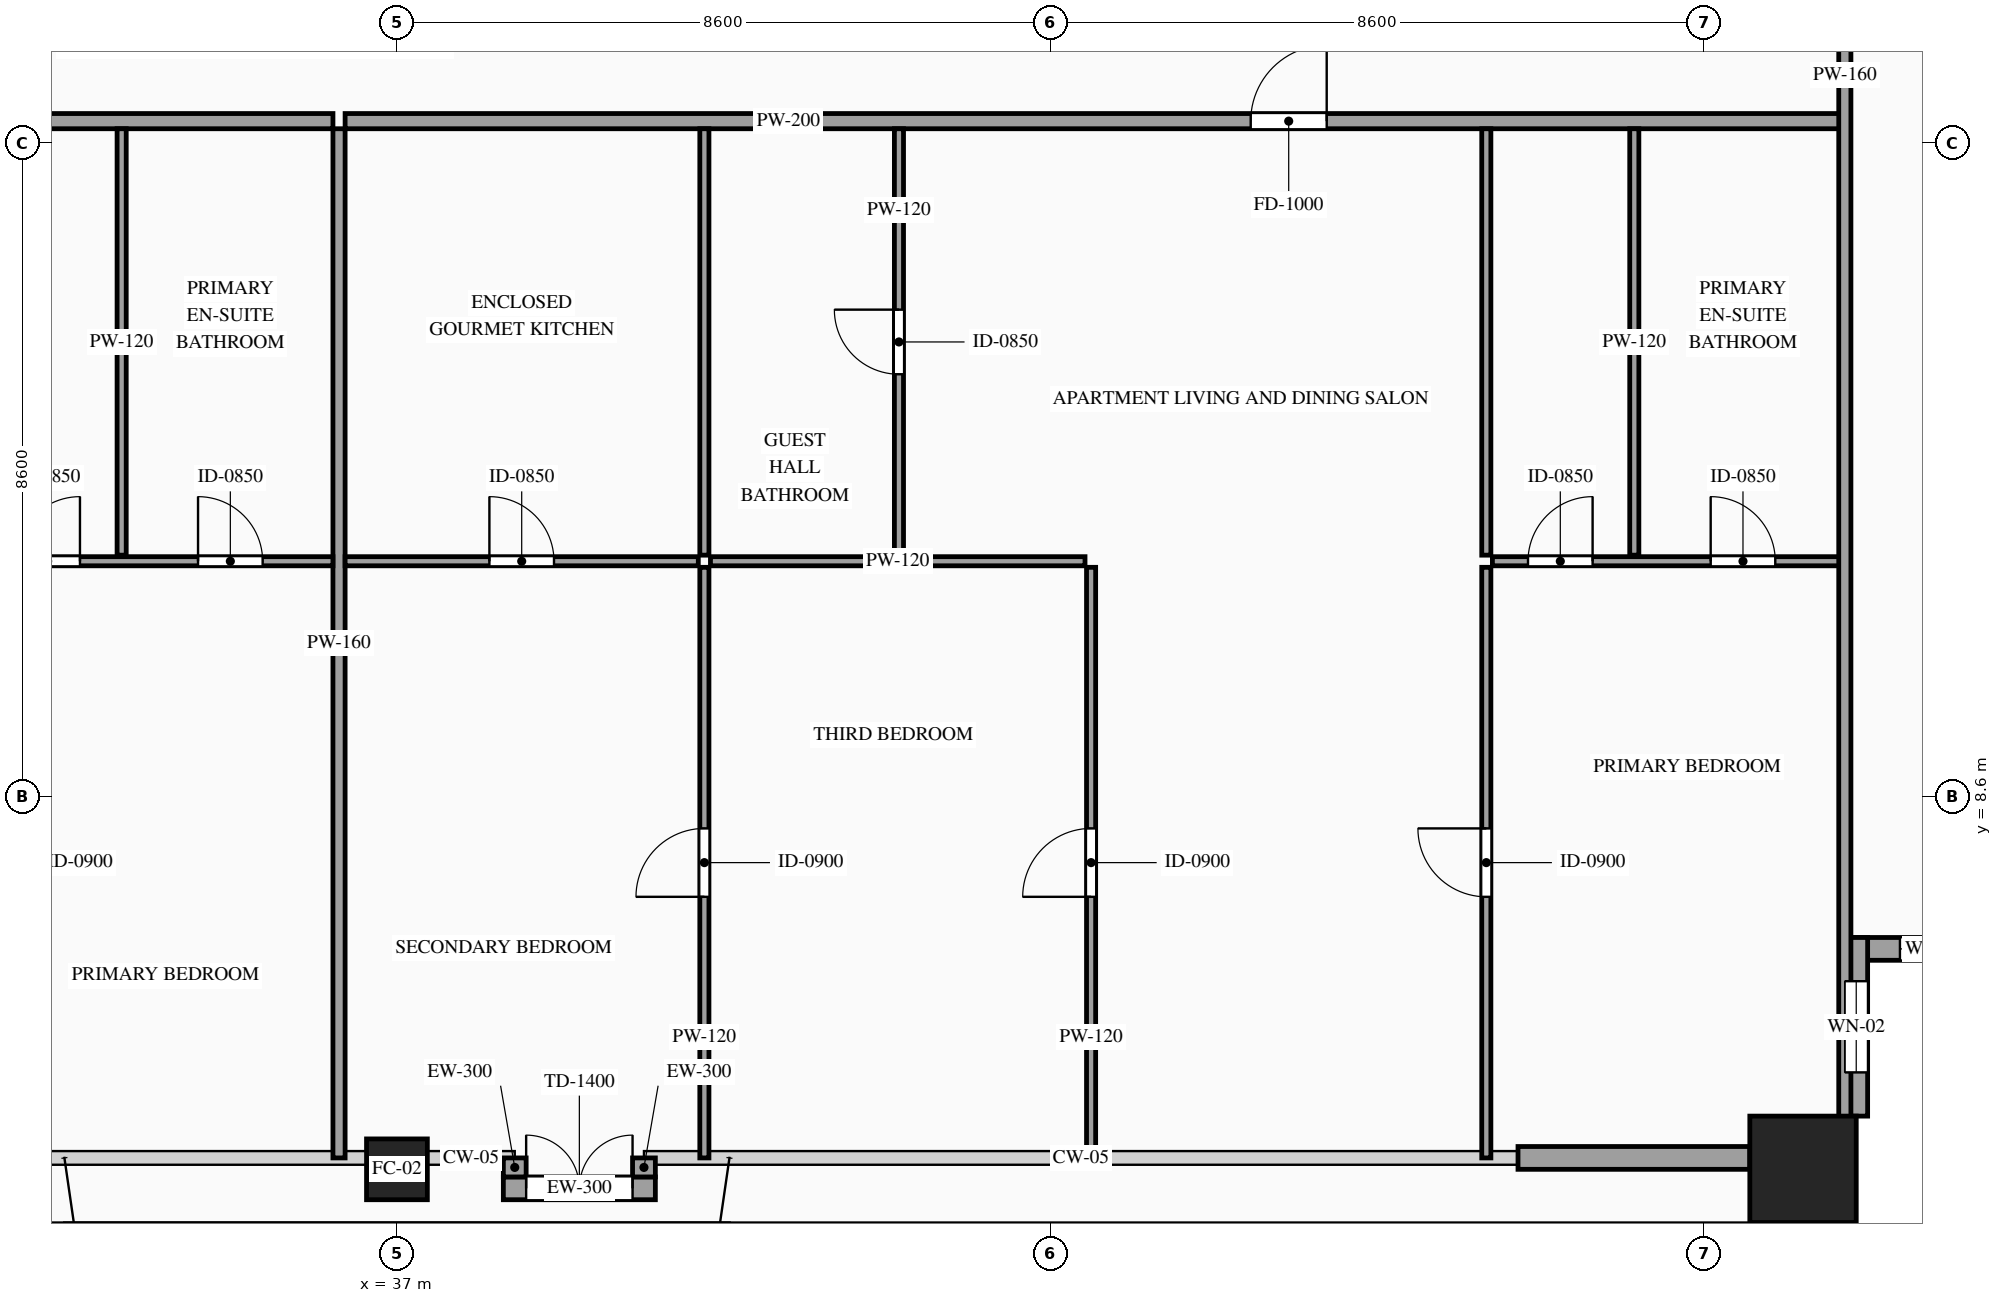
"""IFC4 building model, lengths in metres.
Left out: names, types, materials, properties, quantities, classifications, styles, units other than length and angle.
Written with IfcOpenShell. Run it as: python <this file> out.ifc"""

import sys

from ifc_helpers import new_model, si_unit, direction, frame, frame_2d, origin, origin_2d, place, context, subcontext, project, spatial, rectangle, hollow_rectangle, extrude, source, transform, mapped, element, fill, save


model = new_model("IFC4")
c1 = context("Model", 3, precision=1e-05, world=origin(), true_north=direction((0.0, 1.0)))
c2 = subcontext(c1, "Body", "Model", "MODEL_VIEW")
j1 = project(units=[si_unit("LENGTHUNIT", "METRE"), si_unit("PLANEANGLEUNIT", "RADIAN")], contexts=[c1])
p1 = place(None, origin())
s1 = spatial("IfcSite", under=j1, at=p1, CompositionType="ELEMENT")
p2 = place(p1, origin())
s2 = spatial("IfcBuilding", under=s1, at=p2, CompositionType="ELEMENT")
p3 = place(p2, frame((0.0, 0.0, 191.5)))
s3 = spatial("IfcBuildingStorey", under=s2, at=p3, CompositionType="ELEMENT", Elevation=191.5)
m1 = source(origin(), c2, "Body", "SweptSolid", [
    extrude(hollow_rectangle(XDim=0.8, YDim=0.8, WallThickness=0.036, at=origin_2d()), origin(), (0.0, 0.0, 1.0), 3.5),
])
p4 = place(p3, frame((37.0, 3.7, 0.0), z_axis=(0.0, 0.0, 1.0), x_axis=(1.0, 0.0, 0.0)))
e1 = element("IfcColumn", 1, at=p4, inside=s3, PredefinedType="COLUMN", context=c2, shape_type="MappedRepresentation", body=[
    mapped(m1, transform((0.0, 0.0, 0.0), scale=1.0)),
])
m2 = source(origin(), c2, "Body", "SweptSolid", [
    extrude(hollow_rectangle(XDim=1.4, YDim=1.4, WallThickness=0.06, at=origin_2d()), origin(), (0.0, 0.0, 1.0), 3.5),
])
p5 = place(p3, frame((55.5, 3.7, 0.0), z_axis=(0.0, 0.0, 1.0), x_axis=(1.0, 0.0, 0.0)))
e2 = element("IfcColumn", 2, at=p5, inside=s3, PredefinedType="COLUMN", context=c2, shape_type="MappedRepresentation", body=[
    mapped(m2, transform((0.0, 0.0, 0.0), scale=1.0)),
])
p6 = place(p3, frame((56.05, 6.6, 0.0), z_axis=(0.0, 0.0, 1.0), x_axis=(1.0, 0.0, 0.0)))
e3 = element("IfcWall", 3, at=p6, inside=s3, PredefinedType="SOLIDWALL", context=c2, shape_type="SweptSolid", body=[
    extrude(rectangle(XDim=2.35, YDim=0.3, at=frame_2d((1.175, 0.0))), origin(), (0.0, 0.0, 1.0), 3.28),
])
p7 = place(p6, frame((0.725, 0.0, 0.85)))
e4 = element("IfcOpeningElement", 4, at=p7, cuts=e3, PredefinedType="OPENING", context=c2, shape_type="SweptSolid", body=[
    extrude(rectangle(XDim=0.9, YDim=1.5, at=frame_2d((0.45, 0.75))), frame((0.0, 0.165, 0.0), z_axis=(0.0, -1.0, 0.0), x_axis=(1.0, 0.0, 0.0)), (0.0, 0.0, 1.0), 0.33),
])
p8 = place(p3, frame((56.2, 4.4, 0.0), z_axis=(0.0, 0.0, 1.0), x_axis=(0.0, 1.0, 0.0)))
e5 = element("IfcWall", 5, at=p8, inside=s3, PredefinedType="SOLIDWALL", context=c2, shape_type="SweptSolid", body=[
    extrude(rectangle(XDim=2.35, YDim=0.3, at=frame_2d((1.175, 0.0))), origin(), (0.0, 0.0, 1.0), 3.28),
])
p9 = place(p8, frame((0.575, 0.0, 0.85)))
e6 = element("IfcOpeningElement", 6, at=p9, cuts=e5, PredefinedType="OPENING", context=c2, shape_type="SweptSolid", body=[
    extrude(rectangle(XDim=1.2, YDim=2.1, at=frame_2d((0.6, 1.05))), frame((0.0, 0.165, 0.0), z_axis=(0.0, -1.0, 0.0), x_axis=(1.0, 0.0, 0.0)), (0.0, 0.0, 1.0), 0.33),
])
m3 = source(origin(), c2, "Body", "SweptSolid", [
    extrude(rectangle(XDim=3.05, YDim=0.3, at=frame_2d((1.525, 0.0))), origin(), (0.0, 0.0, 1.0), 2.835),
])
p10 = place(p3, frame((51.75, 3.85, 0.0), z_axis=(0.0, 0.0, 1.0), x_axis=(1.0, 0.0, 0.0)))
e7 = element("IfcWall", 7, at=p10, inside=s3, PredefinedType="SOLIDWALL", context=c2, shape_type="MappedRepresentation", body=[
    mapped(m3, transform((0.0, 0.0, 0.0), scale=1.0)),
])
p11 = place(p3, frame((38.4, 3.45, 0.0), z_axis=(0.0, 0.0, 1.0), x_axis=(1.0, 0.0, 0.0)))
e8 = element("IfcWall", 8, at=p11, inside=s3, PredefinedType="SOLIDWALL", context=c2, shape_type="SweptSolid", body=[
    extrude(rectangle(XDim=2.0, YDim=0.3, at=frame_2d((1.0, 0.0))), origin(), (0.0, 0.0, 1.0), 2.835),
])
p12 = place(p11, frame((0.3, 0.0, 0.0)))
e9 = element("IfcOpeningElement", 9, at=p12, cuts=e8, PredefinedType="OPENING", context=c2, shape_type="SweptSolid", body=[
    extrude(rectangle(XDim=1.4, YDim=2.3, at=frame_2d((0.7, 1.15))), frame((0.0, 0.165, 0.0), z_axis=(0.0, -1.0, 0.0), x_axis=(1.0, 0.0, 0.0)), (0.0, 0.0, 1.0), 0.33),
])
m4 = source(origin(), c2, "Body", "SweptSolid", [
    extrude(rectangle(XDim=0.25, YDim=0.3, at=frame_2d((0.125, 0.0))), origin(), (0.0, 0.0, 1.0), 3.28),
])
for number, where, z_axis, x_axis in (
    (10, (38.55, 3.85, 0.0), (0.0, 0.0, 1.0), (0.0, -1.0, 0.0)),
    (11, (40.25, 3.6, 0.0), (0.0, 0.0, 1.0), (0.0, 1.0, 0.0)),
):
    element("IfcWall", number, at=place(p3, frame(where, z_axis=z_axis, x_axis=x_axis)), inside=s3, PredefinedType="SOLIDWALL", context=c2, shape_type="MappedRepresentation", body=[
        mapped(m4, transform((0.0, 0.0, 0.0), scale=1.0)),
    ])
p13 = place(p3, frame((17.94, 17.49, 0.0), z_axis=(0.0, 0.0, 1.0), x_axis=(1.0, 0.0, 0.0)))
e12 = element("IfcWall", 12, at=p13, inside=s3, PredefinedType="PARTITIONING", context=c2, shape_type="SweptSolid", body=[
    extrude(rectangle(XDim=18.218, YDim=0.2, at=frame_2d((9.109, 0.0))), origin(), (0.0, 0.0, 1.0), 3.28),
])
p14 = place(p13, frame((10.556, 0.0, 0.0)))
e13 = element("IfcOpeningElement", 13, at=p14, cuts=e12, PredefinedType="OPENING", context=c2, shape_type="SweptSolid", body=[
    extrude(rectangle(XDim=1.0, YDim=2.2, at=frame_2d((0.5, 1.1))), frame((0.0, 0.115, 0.0), z_axis=(0.0, -1.0, 0.0), x_axis=(1.0, 0.0, 0.0)), (0.0, 0.0, 1.0), 0.23),
])
m5 = source(origin(), c2, "Body", "SweptSolid", [
    extrude(rectangle(XDim=13.54, YDim=0.16, at=frame_2d((6.77, 0.0))), origin(), (0.0, 0.0, 1.0), 3.28),
])
p15 = place(p3, frame((36.238, 3.85, 0.0), z_axis=(0.0, 0.0, 1.0), x_axis=(0.0, 1.0, 0.0)))
e14 = element("IfcWall", 14, at=p15, inside=s3, PredefinedType="PARTITIONING", context=c2, shape_type="MappedRepresentation", body=[
    mapped(m5, transform((0.0, 0.0, 0.0), scale=1.0)),
])
m6 = source(origin(), c2, "Body", "SweptSolid", [
    extrude(rectangle(XDim=5.61, YDim=0.12, at=frame_2d((2.805, 0.0))), origin(), (0.0, 0.0, 1.0), 3.28),
])
p16 = place(p3, frame((33.378, 11.78, 0.0), z_axis=(0.0, 0.0, 1.0), x_axis=(0.0, 1.0, 0.0)))
e15 = element("IfcWall", 15, at=p16, inside=s3, PredefinedType="PARTITIONING", context=c2, shape_type="MappedRepresentation", body=[
    mapped(m6, transform((0.0, 0.0, 0.0), scale=1.0)),
])
p17 = place(p3, frame((31.511, 11.7, 0.0), z_axis=(0.0, 0.0, 1.0), x_axis=(1.0, 0.0, 0.0)))
e16 = element("IfcWall", 16, at=p17, inside=s3, PredefinedType="PARTITIONING", context=c2, shape_type="SweptSolid", body=[
    extrude(rectangle(XDim=4.647, YDim=0.12, at=frame_2d((2.323, 0.0))), origin(), (0.0, 0.0, 1.0), 2.875),
])
p18 = place(p17, frame((2.872, 0.0, 0.0)))
e17 = element("IfcOpeningElement", 17, at=p18, cuts=e16, PredefinedType="OPENING", context=c2, shape_type="SweptSolid", body=[
    extrude(rectangle(XDim=0.85, YDim=2.1, at=frame_2d((0.425, 1.05))), frame((0.0, 0.075, 0.0), z_axis=(0.0, -1.0, 0.0), x_axis=(1.0, 0.0, 0.0)), (0.0, 0.0, 1.0), 0.15),
])
p19 = place(p17, frame((0.469, 0.0, 0.0)))
e18 = element("IfcOpeningElement", 18, at=p19, cuts=e16, PredefinedType="OPENING", context=c2, shape_type="SweptSolid", body=[
    extrude(rectangle(XDim=0.85, YDim=2.1, at=frame_2d((0.425, 1.05))), frame((0.0, 0.075, 0.0), z_axis=(0.0, -1.0, 0.0), x_axis=(1.0, 0.0, 0.0)), (0.0, 0.0, 1.0), 0.15),
])
p20 = place(p3, frame((36.318, 17.49, 0.0), z_axis=(0.0, 0.0, 1.0), x_axis=(1.0, 0.0, 0.0)))
e19 = element("IfcWall", 19, at=p20, inside=s3, PredefinedType="PARTITIONING", context=c2, shape_type="SweptSolid", body=[
    extrude(rectangle(XDim=19.742, YDim=0.2, at=frame_2d((9.871, 0.0))), origin(), (0.0, 0.0, 1.0), 3.28),
])
p21 = place(p20, frame((11.915, 0.0, 0.0)))
e20 = element("IfcOpeningElement", 20, at=p21, cuts=e19, PredefinedType="OPENING", context=c2, shape_type="SweptSolid", body=[
    extrude(rectangle(XDim=1.0, YDim=2.2, at=frame_2d((0.5, 1.1))), frame((0.0, 0.115, 0.0), z_axis=(0.0, -1.0, 0.0), x_axis=(1.0, 0.0, 0.0)), (0.0, 0.0, 1.0), 0.23),
])
p22 = place(p3, frame((36.318, 11.7, 0.0), z_axis=(0.0, 0.0, 1.0), x_axis=(1.0, 0.0, 0.0)))
e21 = element("IfcWall", 21, at=p22, inside=s3, PredefinedType="PARTITIONING", context=c2, shape_type="SweptSolid", body=[
    extrude(rectangle(XDim=4.647, YDim=0.12, at=frame_2d((2.323, 0.0))), origin(), (0.0, 0.0, 1.0), 2.875),
])
p23 = place(p22, frame((1.898, 0.0, 0.0)))
e22 = element("IfcOpeningElement", 22, at=p23, cuts=e21, PredefinedType="OPENING", context=c2, shape_type="SweptSolid", body=[
    extrude(rectangle(XDim=0.85, YDim=2.1, at=frame_2d((0.425, 1.05))), frame((0.0, 0.075, 0.0), z_axis=(0.0, -1.0, 0.0), x_axis=(1.0, 0.0, 0.0)), (0.0, 0.0, 1.0), 0.15),
])
p24 = place(p3, frame((41.045, 11.78, 0.0), z_axis=(0.0, 0.0, 1.0), x_axis=(0.0, 1.0, 0.0)))
e23 = element("IfcWall", 23, at=p24, inside=s3, PredefinedType="PARTITIONING", context=c2, shape_type="MappedRepresentation", body=[
    mapped(m6, transform((0.0, 0.0, 0.0), scale=1.0)),
])
p25 = place(p3, frame((43.605, 11.78, 0.0), z_axis=(0.0, 0.0, 1.0), x_axis=(0.0, 1.0, 0.0)))
e24 = element("IfcWall", 24, at=p25, inside=s3, PredefinedType="PARTITIONING", context=c2, shape_type="SweptSolid", body=[
    extrude(rectangle(XDim=5.61, YDim=0.12, at=frame_2d((2.805, 0.0))), origin(), (0.0, 0.0, 1.0), 3.28),
])
p26 = place(p25, frame((2.38, 0.0, 0.0)))
e25 = element("IfcOpeningElement", 25, at=p26, cuts=e24, PredefinedType="OPENING", context=c2, shape_type="SweptSolid", body=[
    extrude(rectangle(XDim=0.85, YDim=2.1, at=frame_2d((0.425, 1.05))), frame((0.0, 0.075, 0.0), z_axis=(0.0, -1.0, 0.0), x_axis=(1.0, 0.0, 0.0)), (0.0, 0.0, 1.0), 0.15),
])
for number, where, z_axis, x_axis in (
    (26, (53.28, 11.78, 0.0), (0.0, 0.0, 1.0), (0.0, 1.0, 0.0)),
    (27, (51.333, 11.78, 0.0), (0.0, 0.0, 1.0), (0.0, 1.0, 0.0)),
):
    element("IfcWall", number, at=place(p3, frame(where, z_axis=z_axis, x_axis=x_axis)), inside=s3, PredefinedType="PARTITIONING", context=c2, shape_type="MappedRepresentation", body=[
        mapped(m6, transform((0.0, 0.0, 0.0), scale=1.0)),
    ])
p27 = place(p3, frame((41.045, 3.85, 0.0), z_axis=(0.0, 0.0, 1.0), x_axis=(0.0, 1.0, 0.0)))
e28 = element("IfcWall", 28, at=p27, inside=s3, PredefinedType="PARTITIONING", context=c2, shape_type="SweptSolid", body=[
    extrude(rectangle(XDim=7.77, YDim=0.12, at=frame_2d((3.885, 0.0))), origin(), (0.0, 0.0, 1.0), 3.28),
])
p28 = place(p27, frame((3.435, 0.0, 0.0)))
e29 = element("IfcOpeningElement", 29, at=p28, cuts=e28, PredefinedType="OPENING", context=c2, shape_type="SweptSolid", body=[
    extrude(rectangle(XDim=0.9, YDim=2.15, at=frame_2d((0.45, 1.075))), frame((0.0, 0.075, 0.0), z_axis=(0.0, -1.0, 0.0), x_axis=(1.0, 0.0, 0.0)), (0.0, 0.0, 1.0), 0.15),
])
p29 = place(p3, frame((51.413, 11.7, 0.0), z_axis=(0.0, 0.0, 1.0), x_axis=(1.0, 0.0, 0.0)))
e30 = element("IfcWall", 30, at=p29, inside=s3, PredefinedType="PARTITIONING", context=c2, shape_type="SweptSolid", body=[
    extrude(rectangle(XDim=4.647, YDim=0.12, at=frame_2d((2.323, 0.0))), origin(), (0.0, 0.0, 1.0), 3.28),
])
p30 = place(p29, frame((2.872, 0.0, 0.0)))
e31 = element("IfcOpeningElement", 31, at=p30, cuts=e30, PredefinedType="OPENING", context=c2, shape_type="SweptSolid", body=[
    extrude(rectangle(XDim=0.85, YDim=2.1, at=frame_2d((0.425, 1.05))), frame((0.0, 0.075, 0.0), z_axis=(0.0, -1.0, 0.0), x_axis=(1.0, 0.0, 0.0)), (0.0, 0.0, 1.0), 0.15),
])
p31 = place(p29, frame((0.469, 0.0, 0.0)))
e32 = element("IfcOpeningElement", 32, at=p31, cuts=e30, PredefinedType="OPENING", context=c2, shape_type="SweptSolid", body=[
    extrude(rectangle(XDim=0.85, YDim=2.1, at=frame_2d((0.425, 1.05))), frame((0.0, 0.075, 0.0), z_axis=(0.0, -1.0, 0.0), x_axis=(1.0, 0.0, 0.0)), (0.0, 0.0, 1.0), 0.15),
])
p32 = place(p3, frame((51.333, 3.85, 0.0), z_axis=(0.0, 0.0, 1.0), x_axis=(0.0, 1.0, 0.0)))
e33 = element("IfcWall", 33, at=p32, inside=s3, PredefinedType="PARTITIONING", context=c2, shape_type="SweptSolid", body=[
    extrude(rectangle(XDim=7.77, YDim=0.12, at=frame_2d((3.885, 0.0))), origin(), (0.0, 0.0, 1.0), 3.28),
])
p33 = place(p32, frame((3.435, 0.0, 0.0)))
e34 = element("IfcOpeningElement", 34, at=p33, cuts=e33, PredefinedType="OPENING", context=c2, shape_type="SweptSolid", body=[
    extrude(rectangle(XDim=0.9, YDim=2.15, at=frame_2d((0.45, 1.075))), frame((0.0, 0.075, 0.0), z_axis=(0.0, -1.0, 0.0), x_axis=(1.0, 0.0, 0.0)), (0.0, 0.0, 1.0), 0.15),
])
m7 = source(origin(), c2, "Body", "SweptSolid", [
    extrude(rectangle(XDim=4.928, YDim=0.12, at=frame_2d((2.464, 0.0))), origin(), (0.0, 0.0, 1.0), 2.875),
])
p34 = place(p3, frame((41.125, 11.7, 0.0), z_axis=(0.0, 0.0, 1.0), x_axis=(1.0, 0.0, 0.0)))
e35 = element("IfcWall", 35, at=p34, inside=s3, PredefinedType="PARTITIONING", context=c2, shape_type="MappedRepresentation", body=[
    mapped(m7, transform((0.0, 0.0, 0.0), scale=1.0)),
])
p35 = place(p3, frame((46.133, 3.85, 0.0), z_axis=(0.0, 0.0, 1.0), x_axis=(0.0, 1.0, 0.0)))
e36 = element("IfcWall", 36, at=p35, inside=s3, PredefinedType="PARTITIONING", context=c2, shape_type="SweptSolid", body=[
    extrude(rectangle(XDim=7.77, YDim=0.12, at=frame_2d((3.885, 0.0))), origin(), (0.0, 0.0, 1.0), 3.28),
])
p36 = place(p35, frame((3.435, 0.0, 0.0)))
e37 = element("IfcOpeningElement", 37, at=p36, cuts=e36, PredefinedType="OPENING", context=c2, shape_type="SweptSolid", body=[
    extrude(rectangle(XDim=0.9, YDim=2.15, at=frame_2d((0.45, 1.075))), frame((0.0, 0.075, 0.0), z_axis=(0.0, -1.0, 0.0), x_axis=(1.0, 0.0, 0.0)), (0.0, 0.0, 1.0), 0.15),
])
m8 = source(origin(), c2, "Body", "SweptSolid", [
    extrude(rectangle(XDim=28.19, YDim=0.16, at=frame_2d((14.095, 0.0))), origin(), (0.0, 0.0, 1.0), 3.28),
])
p37 = place(p3, frame((56.05, 4.0, 0.0), z_axis=(0.0, 0.0, 1.0), x_axis=(0.0, 1.0, 0.0)))
e38 = element("IfcWall", 38, at=p37, inside=s3, PredefinedType="PARTITIONING", context=c2, shape_type="MappedRepresentation", body=[
    mapped(m8, transform((0.0, 0.0, 0.0), scale=1.0)),
])
m9 = source(origin(), c2, "Body", "SweptSolid", [
    extrude(rectangle(XDim=0.9, YDim=1.5, at=frame_2d((0.45, 0.75))), frame((0.0, 0.03, 0.0), z_axis=(0.0, -1.0, 0.0), x_axis=(1.0, 0.0, 0.0)), (0.0, 0.0, 1.0), 0.06),
])
p38 = place(p7, origin())
e39 = element("IfcWindow", 39, at=p38, inside=s3, PartitioningType="SINGLE_PANEL", PredefinedType="WINDOW", context=c2, shape_type="MappedRepresentation", body=[
    mapped(m9, transform((0.0, 0.0, 0.0), scale=1.0)),
])
fill(e4, e39)
m10 = source(origin(), c2, "Body", "SweptSolid", [
    extrude(rectangle(XDim=1.2, YDim=2.1, at=frame_2d((0.6, 1.05))), frame((0.0, 0.03, 0.0), z_axis=(0.0, -1.0, 0.0), x_axis=(1.0, 0.0, 0.0)), (0.0, 0.0, 1.0), 0.06),
])
p39 = place(p9, origin())
e40 = element("IfcWindow", 40, at=p39, inside=s3, PartitioningType="SINGLE_PANEL", PredefinedType="WINDOW", context=c2, shape_type="MappedRepresentation", body=[
    mapped(m10, transform((0.0, 0.0, 0.0), scale=1.0)),
])
fill(e6, e40)
m11 = source(origin(), c2, "Body", "SweptSolid", [
    extrude(rectangle(XDim=1.4, YDim=2.3, at=frame_2d((0.7, 1.15))), frame((0.0, 0.025, 0.0), z_axis=(0.0, -1.0, 0.0), x_axis=(1.0, 0.0, 0.0)), (0.0, 0.0, 1.0), 0.05),
])
p40 = place(p12, origin())
e41 = element("IfcDoor", 41, at=p40, inside=s3, OperationType="DOUBLE_DOOR_SINGLE_SWING", PredefinedType="DOOR", context=c2, shape_type="MappedRepresentation", body=[
    mapped(m11, transform((0.0, 0.0, 0.0), scale=1.0)),
])
fill(e9, e41)
m12 = source(origin(), c2, "Body", "SweptSolid", [
    extrude(rectangle(XDim=0.85, YDim=2.1, at=frame_2d((0.425, 1.05))), frame((0.0, 0.025, 0.0), z_axis=(0.0, -1.0, 0.0), x_axis=(1.0, 0.0, 0.0)), (0.0, 0.0, 1.0), 0.05),
])
p41 = place(p18, origin())
e42 = element("IfcDoor", 42, at=p41, inside=s3, OperationType="SINGLE_SWING_LEFT", PredefinedType="DOOR", context=c2, shape_type="MappedRepresentation", body=[
    mapped(m12, transform((0.0, 0.0, 0.0), scale=1.0)),
])
fill(e17, e42)
p42 = place(p19, origin())
e43 = element("IfcDoor", 43, at=p42, inside=s3, OperationType="SINGLE_SWING_RIGHT", PredefinedType="DOOR", context=c2, shape_type="MappedRepresentation", body=[
    mapped(m12, transform((0.0, 0.0, 0.0), scale=1.0)),
])
fill(e18, e43)
m13 = source(origin(), c2, "Body", "SweptSolid", [
    extrude(rectangle(XDim=1.0, YDim=2.2, at=frame_2d((0.5, 1.1))), frame((0.0, 0.025, 0.0), z_axis=(0.0, -1.0, 0.0), x_axis=(1.0, 0.0, 0.0)), (0.0, 0.0, 1.0), 0.05),
])
p43 = place(p21, origin())
e44 = element("IfcDoor", 44, at=p43, inside=s3, OperationType="SINGLE_SWING_RIGHT", PredefinedType="DOOR", context=c2, shape_type="MappedRepresentation", body=[
    mapped(m13, transform((0.0, 0.0, 0.0), scale=1.0)),
])
fill(e20, e44)
p44 = place(p23, origin())
e45 = element("IfcDoor", 45, at=p44, inside=s3, OperationType="SINGLE_SWING_LEFT", PredefinedType="DOOR", context=c2, shape_type="MappedRepresentation", body=[
    mapped(m12, transform((0.0, 0.0, 0.0), scale=1.0)),
])
fill(e22, e45)
p45 = place(p26, origin())
e46 = element("IfcDoor", 46, at=p45, inside=s3, OperationType="SINGLE_SWING_RIGHT", PredefinedType="DOOR", context=c2, shape_type="MappedRepresentation", body=[
    mapped(m12, transform((0.0, 0.0, 0.0), scale=1.0)),
])
fill(e25, e46)
p46 = place(p30, origin())
e47 = element("IfcDoor", 47, at=p46, inside=s3, OperationType="SINGLE_SWING_LEFT", PredefinedType="DOOR", context=c2, shape_type="MappedRepresentation", body=[
    mapped(m12, transform((0.0, 0.0, 0.0), scale=1.0)),
])
fill(e31, e47)
p47 = place(p31, origin())
e48 = element("IfcDoor", 48, at=p47, inside=s3, OperationType="SINGLE_SWING_RIGHT", PredefinedType="DOOR", context=c2, shape_type="MappedRepresentation", body=[
    mapped(m12, transform((0.0, 0.0, 0.0), scale=1.0)),
])
fill(e32, e48)
m14 = source(origin(), c2, "Body", "SweptSolid", [
    extrude(rectangle(XDim=0.9, YDim=2.15, at=frame_2d((0.45, 1.075))), frame((0.0, 0.025, 0.0), z_axis=(0.0, -1.0, 0.0), x_axis=(1.0, 0.0, 0.0)), (0.0, 0.0, 1.0), 0.05),
])
p48 = place(p28, origin())
e49 = element("IfcDoor", 49, at=p48, inside=s3, OperationType="SINGLE_SWING_LEFT", PredefinedType="DOOR", context=c2, shape_type="MappedRepresentation", body=[
    mapped(m14, transform((0.0, 0.0, 0.0), scale=1.0)),
])
fill(e29, e49)
p49 = place(p33, origin())
e50 = element("IfcDoor", 50, at=p49, inside=s3, OperationType="SINGLE_SWING_RIGHT", PredefinedType="DOOR", context=c2, shape_type="MappedRepresentation", body=[
    mapped(m14, transform((0.0, 0.0, 0.0), scale=1.0)),
])
fill(e34, e50)
p50 = place(p36, origin())
e51 = element("IfcDoor", 51, at=p50, inside=s3, OperationType="SINGLE_SWING_LEFT", PredefinedType="DOOR", context=c2, shape_type="MappedRepresentation", body=[
    mapped(m14, transform((0.0, 0.0, 0.0), scale=1.0)),
])
fill(e37, e51)
save(model, sys.argv[1])
